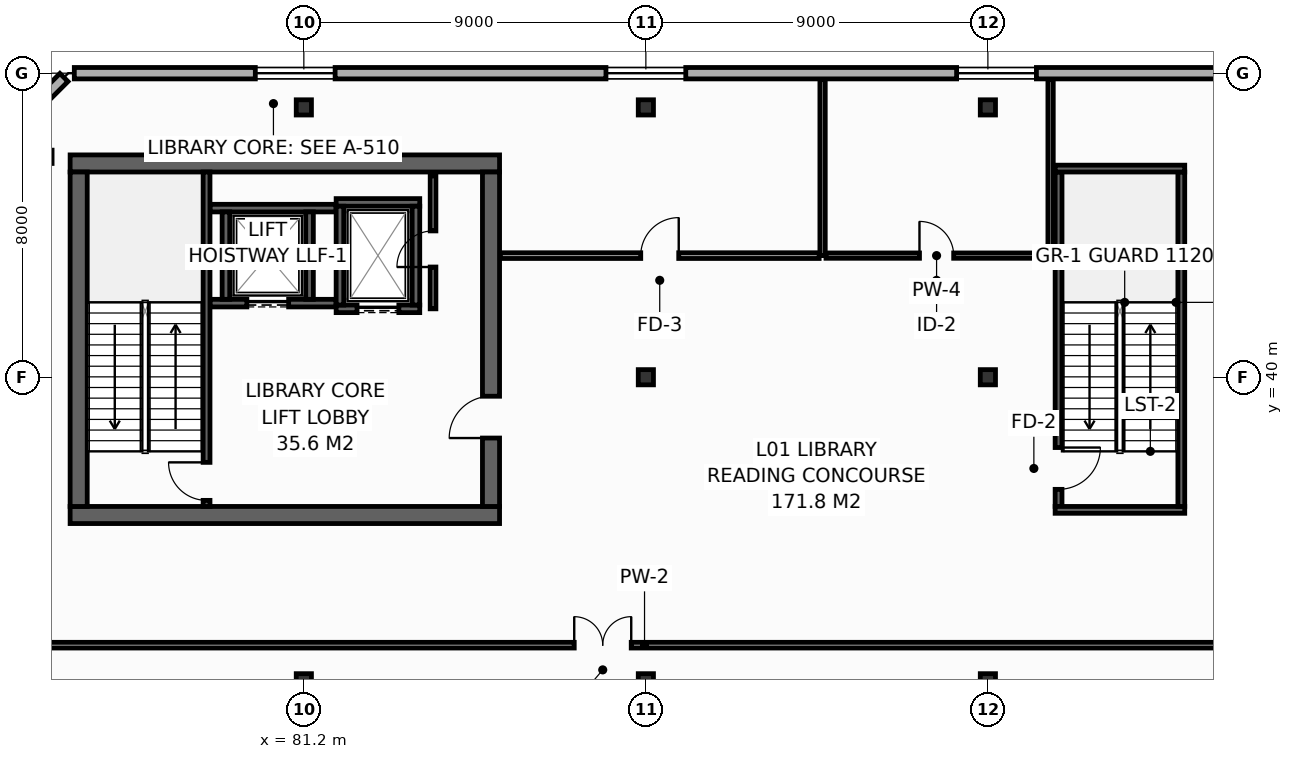
"""IFC4 building model, lengths in metres.
Left out: names, types, materials, properties, quantities, classifications, styles, units other than length and angle.
Written with IfcOpenShell. Run it as: python <this file> out.ifc"""

import sys

from ifc_helpers import new_model, si_unit, direction, frame, frame_2d, origin, origin_2d, place, context, subcontext, project, spatial, rectangle, i_section, extrude, element, fill, save


model = new_model("IFC4")
c1 = context("Model", 3, precision=1e-05, world=origin(), true_north=direction((0.0, 1.0)))
c2 = subcontext(c1, "Body", "Model", "MODEL_VIEW")
j1 = project(units=[si_unit("LENGTHUNIT", "METRE"), si_unit("PLANEANGLEUNIT", "RADIAN")], contexts=[c1])
p1 = place(None, origin())
s1 = spatial("IfcSite", under=j1, at=p1, CompositionType="ELEMENT")
p2 = place(p1, origin())
s2 = spatial("IfcBuilding", under=s1, at=p2, CompositionType="ELEMENT")
p3 = place(p2, frame((0.0, 0.0, 6.0)))
s3 = spatial("IfcBuildingStorey", under=s2, at=p3, CompositionType="ELEMENT", Elevation=6.0)
for number, where, z_axis, x_axis in (
    (1, (75.05, 36.375, 0.0), (0.0, 0.0, 1.0), (1.0, 0.0, 0.0)),
    (2, (75.05, 45.625, 0.0), (0.0, 0.0, 1.0), (1.0, 0.0, 0.0)),
):
    element("IfcWall", number, at=place(p3, frame(where, z_axis=z_axis, x_axis=x_axis)), inside=s3, PredefinedType="SHEAR", context=c2, shape_type="SweptSolid", body=[
        extrude(rectangle(XDim=11.3, YDim=0.45, at=frame_2d((5.65, 0.0))), origin(), (0.0, 0.0, 1.0), 5.1),
    ])
p4 = place(p3, frame((75.275, 36.6, 0.0), z_axis=(0.0, 0.0, 1.0), x_axis=(0.0, 1.0, 0.0)))
e3 = element("IfcWall", 3, at=p4, inside=s3, PredefinedType="SHEAR", context=c2, shape_type="SweptSolid", body=[
    extrude(rectangle(XDim=8.8, YDim=0.45, at=frame_2d((4.4, 0.0))), origin(), (0.0, 0.0, 1.0), 5.1),
])
p5 = place(p3, frame((86.125, 36.6, 0.0), z_axis=(0.0, 0.0, 1.0), x_axis=(0.0, 1.0, 0.0)))
e4 = element("IfcWall", 4, at=p5, inside=s3, PredefinedType="SHEAR", context=c2, shape_type="SweptSolid", body=[
    extrude(rectangle(XDim=8.8, YDim=0.45, at=frame_2d((4.4, 0.0))), origin(), (0.0, 0.0, 1.0), 5.1),
])
p6 = place(p5, frame((1.8, 0.0, 0.0)))
e5 = element("IfcOpeningElement", 5, at=p6, cuts=e4, PredefinedType="OPENING", context=c2, shape_type="SweptSolid", body=[
    extrude(rectangle(XDim=1.1, YDim=2.15, at=frame_2d((0.55, 1.075))), frame((0.0, 0.235, 0.0), z_axis=(0.0, -1.0, 0.0), x_axis=(1.0, 0.0, 0.0)), (0.0, 0.0, 1.0), 0.47),
])
for number, where, z_axis, x_axis in (
    (6, (81.2, 32.0, 0.0), (0.0, 0.0, 1.0), (1.0, 0.0, 0.0)),
    (7, (81.2, 47.1, 0.0), (0.0, 0.0, 1.0), (1.0, 0.0, 0.0)),
    (8, (90.2, 32.0, 0.0), (0.0, 0.0, 1.0), (1.0, 0.0, 0.0)),
    (9, (90.2, 40.0, 0.0), (0.0, 0.0, 1.0), (1.0, 0.0, 0.0)),
    (10, (90.2, 47.1, 0.0), (0.0, 0.0, 1.0), (1.0, 0.0, 0.0)),
    (11, (99.2, 32.0, 0.0), (0.0, 0.0, 1.0), (1.0, 0.0, 0.0)),
    (12, (99.2, 40.0, 0.0), (0.0, 0.0, 1.0), (1.0, 0.0, 0.0)),
    (13, (99.2, 47.1, 0.0), (0.0, 0.0, 1.0), (1.0, 0.0, 0.0)),
):
    element("IfcColumn", number, at=place(p3, frame(where, z_axis=z_axis, x_axis=x_axis)), inside=s3, PredefinedType="COLUMN", context=c2, shape_type="SweptSolid", body=[
        extrude(i_section(OverallWidth=0.4, OverallDepth=0.4, WebThickness=0.013, FlangeThickness=0.021, FilletRadius=0.022, at=origin_2d()), origin(), (0.0, 0.0, 1.0), 5.4),
    ])
p7 = place(p3, frame((78.73, 41.95, 0.0), z_axis=(0.0, 0.0, 1.0), x_axis=(1.0, 0.0, 0.0)))
e14 = element("IfcWall", 14, at=p7, inside=s3, PredefinedType="SHEAR", context=c2, shape_type="SweptSolid", body=[
    extrude(rectangle(XDim=3.32, YDim=0.2, at=frame_2d((1.66, 0.0))), origin(), (0.0, 0.0, 1.0), 5.1),
])
p8 = place(p7, frame((0.97, 0.0, 0.0)))
e15 = element("IfcOpeningElement", 15, at=p8, cuts=e14, PredefinedType="OPENING", context=c2, shape_type="SweptSolid", body=[
    extrude(rectangle(XDim=1.1, YDim=2.2, at=frame_2d((0.55, 1.1))), frame((0.0, 0.11, 0.0), z_axis=(0.0, -1.0, 0.0), x_axis=(1.0, 0.0, 0.0)), (0.0, 0.0, 1.0), 0.22),
])
p9 = place(p3, frame((78.73, 44.45, 0.0), z_axis=(0.0, 0.0, 1.0), x_axis=(1.0, 0.0, 0.0)))
e16 = element("IfcWall", 16, at=p9, inside=s3, PredefinedType="SHEAR", context=c2, shape_type="SweptSolid", body=[
    extrude(rectangle(XDim=3.32, YDim=0.2, at=frame_2d((1.66, 0.0))), origin(), (0.0, 0.0, 1.0), 5.1),
])
for number, where, z_axis, x_axis in (
    (17, (79.15, 42.05, 0.0), (0.0, 0.0, 1.0), (0.0, 1.0, 0.0)),
    (18, (81.35, 42.05, 0.0), (0.0, 0.0, 1.0), (0.0, 1.0, 0.0)),
):
    element("IfcWall", number, at=place(p3, frame(where, z_axis=z_axis, x_axis=x_axis)), inside=s3, PredefinedType="SHEAR", context=c2, shape_type="SweptSolid", body=[
        extrude(rectangle(XDim=2.3, YDim=0.2, at=frame_2d((1.15, 0.0))), origin(), (0.0, 0.0, 1.0), 5.1),
    ])
p10 = place(p3, frame((82.05, 41.8, 0.0), z_axis=(0.0, 0.0, 1.0), x_axis=(1.0, 0.0, 0.0)))
e19 = element("IfcWall", 19, at=p10, inside=s3, PredefinedType="SHEAR", context=c2, shape_type="SweptSolid", body=[
    extrude(rectangle(XDim=2.2, YDim=0.2, at=frame_2d((1.1, 0.0))), origin(), (0.0, 0.0, 1.0), 5.1),
])
p11 = place(p10, frame((0.55, 0.0, 0.0)))
e20 = element("IfcOpeningElement", 20, at=p11, cuts=e19, PredefinedType="OPENING", context=c2, shape_type="SweptSolid", body=[
    extrude(rectangle(XDim=1.1, YDim=2.2, at=frame_2d((0.55, 1.1))), frame((0.0, 0.11, 0.0), z_axis=(0.0, -1.0, 0.0), x_axis=(1.0, 0.0, 0.0)), (0.0, 0.0, 1.0), 0.22),
])
p12 = place(p3, frame((82.05, 44.6, 0.0), z_axis=(0.0, 0.0, 1.0), x_axis=(1.0, 0.0, 0.0)))
e21 = element("IfcWall", 21, at=p12, inside=s3, PredefinedType="SHEAR", context=c2, shape_type="SweptSolid", body=[
    extrude(rectangle(XDim=2.2, YDim=0.2, at=frame_2d((1.1, 0.0))), origin(), (0.0, 0.0, 1.0), 5.1),
])
for number, where, z_axis, x_axis in (
    (22, (82.15, 41.9, 0.0), (0.0, 0.0, 1.0), (0.0, 1.0, 0.0)),
    (23, (84.15, 41.9, 0.0), (0.0, 0.0, 1.0), (0.0, 1.0, 0.0)),
):
    element("IfcWall", number, at=place(p3, frame(where, z_axis=z_axis, x_axis=x_axis)), inside=s3, PredefinedType="SHEAR", context=c2, shape_type="SweptSolid", body=[
        extrude(rectangle(XDim=2.6, YDim=0.2, at=frame_2d((1.3, 0.0))), origin(), (0.0, 0.0, 1.0), 5.1),
    ])
p13 = place(p3, frame((78.64, 36.6, 0.0), z_axis=(0.0, 0.0, 1.0), x_axis=(0.0, 1.0, 0.0)))
e24 = element("IfcWall", 24, at=p13, inside=s3, PredefinedType="SHEAR", context=c2, shape_type="SweptSolid", body=[
    extrude(rectangle(XDim=8.8, YDim=0.18, at=frame_2d((4.4, 0.0))), origin(), (0.0, 0.0, 1.0), 5.1),
])
p14 = place(p13, frame((0.16, 0.0, 0.0)))
e25 = element("IfcOpeningElement", 25, at=p14, cuts=e24, PredefinedType="OPENING", context=c2, shape_type="SweptSolid", body=[
    extrude(rectangle(XDim=1.0, YDim=2.15, at=frame_2d((0.5, 1.075))), frame((0.0, 0.1, 0.0), z_axis=(0.0, -1.0, 0.0), x_axis=(1.0, 0.0, 0.0)), (0.0, 0.0, 1.0), 0.2),
])
p15 = place(p3, frame((101.06, 45.4, 0.0), z_axis=(0.0, 0.0, 1.0), x_axis=(0.0, -1.0, 0.0)))
e26 = element("IfcWall", 26, at=p15, inside=s3, PredefinedType="SHEAR", context=c2, shape_type="SweptSolid", body=[
    extrude(rectangle(XDim=8.8, YDim=0.18, at=frame_2d((4.4, 0.0))), origin(), (0.0, 0.0, 1.0), 5.1),
])
p16 = place(p15, frame((7.25, 0.0, 0.0)))
e27 = element("IfcOpeningElement", 27, at=p16, cuts=e26, PredefinedType="OPENING", context=c2, shape_type="SweptSolid", body=[
    extrude(rectangle(XDim=1.1, YDim=2.15, at=frame_2d((0.55, 1.075))), frame((0.0, 0.1, 0.0), z_axis=(0.0, -1.0, 0.0), x_axis=(1.0, 0.0, 0.0)), (0.0, 0.0, 1.0), 0.2),
])
p17 = place(p3, frame((100.97, 36.51, 0.0), z_axis=(0.0, 0.0, 1.0), x_axis=(1.0, 0.0, 0.0)))
e28 = element("IfcWall", 28, at=p17, inside=s3, PredefinedType="SHEAR", context=c2, shape_type="SweptSolid", body=[
    extrude(rectangle(XDim=3.41, YDim=0.18, at=frame_2d((1.705, 0.0))), origin(), (0.0, 0.0, 1.0), 5.1),
])
p18 = place(p3, frame((104.29, 36.6, 0.0), z_axis=(0.0, 0.0, 1.0), x_axis=(0.0, 1.0, 0.0)))
e29 = element("IfcWall", 29, at=p18, inside=s3, PredefinedType="SHEAR", context=c2, shape_type="SweptSolid", body=[
    extrude(rectangle(XDim=8.8, YDim=0.18, at=frame_2d((4.4, 0.0))), origin(), (0.0, 0.0, 1.0), 5.1),
])
p19 = place(p3, frame((104.38, 45.49, 0.0), z_axis=(0.0, 0.0, 1.0), x_axis=(-1.0, 0.0, 0.0)))
e30 = element("IfcWall", 30, at=p19, inside=s3, PredefinedType="SHEAR", context=c2, shape_type="SweptSolid", body=[
    extrude(rectangle(XDim=3.41, YDim=0.18, at=frame_2d((1.705, 0.0))), origin(), (0.0, 0.0, 1.0), 5.1),
])
p20 = place(p3, frame((84.6, 41.8, 0.0), z_axis=(0.0, 0.0, 1.0), x_axis=(0.0, 1.0, 0.0)))
e31 = element("IfcWall", 31, at=p20, inside=s3, PredefinedType="PARTITIONING", context=c2, shape_type="SweptSolid", body=[
    extrude(rectangle(XDim=3.5, YDim=0.15, at=frame_2d((1.75, 0.0))), origin(), (0.0, 0.0, 1.0), 5.1),
])
p21 = place(p20, frame((1.1, 0.0, 0.0)))
e32 = element("IfcOpeningElement", 32, at=p21, cuts=e31, PredefinedType="OPENING", context=c2, shape_type="SweptSolid", body=[
    extrude(rectangle(XDim=0.95, YDim=2.15, at=frame_2d((0.475, 1.075))), frame((0.0, 0.085, 0.0), z_axis=(0.0, -1.0, 0.0), x_axis=(1.0, 0.0, 0.0)), (0.0, 0.0, 1.0), 0.17),
])
p22 = place(p3, frame((105.24, 48.0, 0.0), z_axis=(0.0, 0.0, 1.0), x_axis=(-1.0, 0.0, 0.0)))
e33 = element("IfcWall", 33, at=p22, inside=s3, PredefinedType="STANDARD", context=c2, shape_type="SweptSolid", body=[
    extrude(rectangle(XDim=30.08, YDim=0.3, at=frame_2d((15.04, 0.0))), origin(), (0.0, 0.0, 1.0), 5.1),
])
p23 = place(p22, frame((4.763, 0.0, 0.9)))
e34 = element("IfcOpeningElement", 34, at=p23, cuts=e33, PredefinedType="OPENING", context=c2, shape_type="SweptSolid", body=[
    extrude(rectangle(XDim=2.1, YDim=2.5, at=frame_2d((1.05, 1.25))), frame((0.0, 0.16, 0.0), z_axis=(0.0, -1.0, 0.0), x_axis=(1.0, 0.0, 0.0)), (0.0, 0.0, 1.0), 0.32),
])
p24 = place(p22, frame((13.99, 0.0, 0.9)))
e35 = element("IfcOpeningElement", 35, at=p24, cuts=e33, PredefinedType="OPENING", context=c2, shape_type="SweptSolid", body=[
    extrude(rectangle(XDim=2.1, YDim=2.5, at=frame_2d((1.05, 1.25))), frame((0.0, 0.16, 0.0), z_axis=(0.0, -1.0, 0.0), x_axis=(1.0, 0.0, 0.0)), (0.0, 0.0, 1.0), 0.32),
])
p25 = place(p22, frame((23.217, 0.0, 0.9)))
e36 = element("IfcOpeningElement", 36, at=p25, cuts=e33, PredefinedType="OPENING", context=c2, shape_type="SweptSolid", body=[
    extrude(rectangle(XDim=2.1, YDim=2.5, at=frame_2d((1.05, 1.25))), frame((0.0, 0.16, 0.0), z_axis=(0.0, -1.0, 0.0), x_axis=(1.0, 0.0, 0.0)), (0.0, 0.0, 1.0), 0.32),
])
p26 = place(p3, frame((74.887, 47.887, 0.0), z_axis=(0.0, 0.0, 1.0), x_axis=(-0.707106781187, -0.707106781187, 0.0)))
e37 = element("IfcWall", 37, at=p26, inside=s3, PredefinedType="STANDARD", context=c2, shape_type="SweptSolid", body=[
    extrude(rectangle(XDim=3.64, YDim=0.3, at=frame_2d((1.82, 0.0))), origin(), (0.0, 0.0, 1.0), 5.1),
])
p27 = place(p3, frame((72.3, 32.95, 0.0), z_axis=(0.0, 0.0, 1.0), x_axis=(1.0, 0.0, 0.0)))
e38 = element("IfcWall", 38, at=p27, inside=s3, PredefinedType="PARTITIONING", context=c2, shape_type="SweptSolid", body=[
    extrude(rectangle(XDim=35.73, YDim=0.15, at=frame_2d((17.865, 0.0))), origin(), (0.0, 0.0, 1.0), 4.385),
])
p28 = place(p27, frame((16.015, 0.0, 0.0)))
e39 = element("IfcOpeningElement", 39, at=p28, cuts=e38, PredefinedType="OPENING", context=c2, shape_type="SweptSolid", body=[
    extrude(rectangle(XDim=1.5, YDim=2.2, at=frame_2d((0.75, 1.1))), frame((0.0, 0.085, 0.0), z_axis=(0.0, -1.0, 0.0), x_axis=(1.0, 0.0, 0.0)), (0.0, 0.0, 1.0), 0.17),
])
p29 = place(p3, frame((94.85, 43.2, 0.0), z_axis=(0.0, 0.0, 1.0), x_axis=(0.0, 1.0, 0.0)))
e40 = element("IfcWall", 40, at=p29, inside=s3, PredefinedType="PARTITIONING", context=c2, shape_type="SweptSolid", body=[
    extrude(rectangle(XDim=4.63, YDim=0.14, at=frame_2d((2.315, 0.0))), origin(), (0.0, 0.0, 1.0), 4.385),
])
p30 = place(p3, frame((100.85, 43.2, 0.0), z_axis=(0.0, 0.0, 1.0), x_axis=(0.0, 1.0, 0.0)))
e41 = element("IfcWall", 41, at=p30, inside=s3, PredefinedType="PARTITIONING", context=c2, shape_type="SweptSolid", body=[
    extrude(rectangle(XDim=4.63, YDim=0.14, at=frame_2d((2.315, 0.0))), origin(), (0.0, 0.0, 1.0), 5.1),
])
p31 = place(p3, frame((86.37, 43.2, 0.0), z_axis=(0.0, 0.0, 1.0), x_axis=(1.0, 0.0, 0.0)))
e42 = element("IfcWall", 42, at=p31, inside=s3, PredefinedType="PARTITIONING", context=c2, shape_type="SweptSolid", body=[
    extrude(rectangle(XDim=8.39, YDim=0.15, at=frame_2d((4.195, 0.0))), origin(), (0.0, 0.0, 1.0), 4.385),
])
p32 = place(p31, frame((3.695, 0.0, 0.0)))
e43 = element("IfcOpeningElement", 43, at=p32, cuts=e42, PredefinedType="OPENING", context=c2, shape_type="SweptSolid", body=[
    extrude(rectangle(XDim=1.0, YDim=2.15, at=frame_2d((0.5, 1.075))), frame((0.0, 0.085, 0.0), z_axis=(0.0, -1.0, 0.0), x_axis=(1.0, 0.0, 0.0)), (0.0, 0.0, 1.0), 0.17),
])
p33 = place(p3, frame((94.94, 43.2, 0.0), z_axis=(0.0, 0.0, 1.0), x_axis=(1.0, 0.0, 0.0)))
e44 = element("IfcWall", 44, at=p33, inside=s3, PredefinedType="PARTITIONING", context=c2, shape_type="SweptSolid", body=[
    extrude(rectangle(XDim=5.82, YDim=0.14, at=frame_2d((2.91, 0.0))), origin(), (0.0, 0.0, 1.0), 4.385),
])
p34 = place(p33, frame((2.46, 0.0, 0.0)))
e45 = element("IfcOpeningElement", 45, at=p34, cuts=e44, PredefinedType="OPENING", context=c2, shape_type="SweptSolid", body=[
    extrude(rectangle(XDim=0.9, YDim=2.1, at=frame_2d((0.45, 1.05))), frame((0.0, 0.08, 0.0), z_axis=(0.0, -1.0, 0.0), x_axis=(1.0, 0.0, 0.0)), (0.0, 0.0, 1.0), 0.16),
])
p35 = place(p8, origin())
e46 = element("IfcDoor", 46, at=p35, inside=s3, OperationType="SLIDING_TO_LEFT", PredefinedType="DOOR", context=c2, shape_type="SweptSolid", body=[
    extrude(rectangle(XDim=1.1, YDim=2.2, at=frame_2d((0.55, 1.1))), frame((0.0, 0.025, 0.0), z_axis=(0.0, -1.0, 0.0), x_axis=(1.0, 0.0, 0.0)), (0.0, 0.0, 1.0), 0.05),
])
fill(e15, e46)
p36 = place(p11, origin())
e47 = element("IfcDoor", 47, at=p36, inside=s3, OperationType="SLIDING_TO_LEFT", PredefinedType="DOOR", context=c2, shape_type="SweptSolid", body=[
    extrude(rectangle(XDim=1.1, YDim=2.2, at=frame_2d((0.55, 1.1))), frame((0.0, 0.025, 0.0), z_axis=(0.0, -1.0, 0.0), x_axis=(1.0, 0.0, 0.0)), (0.0, 0.0, 1.0), 0.05),
])
fill(e20, e47)
p37 = place(p14, origin())
e48 = element("IfcDoor", 48, at=p37, inside=s3, OperationType="SINGLE_SWING_RIGHT", PredefinedType="DOOR", context=c2, shape_type="SweptSolid", body=[
    extrude(rectangle(XDim=1.0, YDim=2.15, at=frame_2d((0.5, 1.075))), frame((0.0, 0.025, 0.0), z_axis=(0.0, -1.0, 0.0), x_axis=(1.0, 0.0, 0.0)), (0.0, 0.0, 1.0), 0.05),
])
fill(e25, e48)
p38 = place(p16, origin())
e49 = element("IfcDoor", 49, at=p38, inside=s3, OperationType="SINGLE_SWING_LEFT", PredefinedType="DOOR", context=c2, shape_type="SweptSolid", body=[
    extrude(rectangle(XDim=1.1, YDim=2.15, at=frame_2d((0.55, 1.075))), frame((0.0, 0.025, 0.0), z_axis=(0.0, -1.0, 0.0), x_axis=(1.0, 0.0, 0.0)), (0.0, 0.0, 1.0), 0.05),
])
fill(e27, e49)
p39 = place(p6, origin())
e50 = element("IfcDoor", 50, at=p39, inside=s3, OperationType="SINGLE_SWING_LEFT", PredefinedType="DOOR", context=c2, shape_type="SweptSolid", body=[
    extrude(rectangle(XDim=1.1, YDim=2.15, at=frame_2d((0.55, 1.075))), frame((0.0, 0.025, 0.0), z_axis=(0.0, -1.0, 0.0), x_axis=(1.0, 0.0, 0.0)), (0.0, 0.0, 1.0), 0.05),
])
fill(e5, e50)
p40 = place(p21, origin())
e51 = element("IfcDoor", 51, at=p40, inside=s3, OperationType="SINGLE_SWING_LEFT", PredefinedType="DOOR", context=c2, shape_type="SweptSolid", body=[
    extrude(rectangle(XDim=0.95, YDim=2.15, at=frame_2d((0.475, 1.075))), frame((0.0, 0.025, 0.0), z_axis=(0.0, -1.0, 0.0), x_axis=(1.0, 0.0, 0.0)), (0.0, 0.0, 1.0), 0.05),
])
fill(e32, e51)
p41 = place(p23, origin())
e52 = element("IfcWindow", 52, at=p41, inside=s3, PartitioningType="DOUBLE_PANEL_VERTICAL", PredefinedType="WINDOW", context=c2, shape_type="SweptSolid", body=[
    extrude(rectangle(XDim=2.1, YDim=2.5, at=frame_2d((1.05, 1.25))), frame((0.0, 0.03, 0.0), z_axis=(0.0, -1.0, 0.0), x_axis=(1.0, 0.0, 0.0)), (0.0, 0.0, 1.0), 0.06),
])
fill(e34, e52)
p42 = place(p24, origin())
e53 = element("IfcWindow", 53, at=p42, inside=s3, PartitioningType="DOUBLE_PANEL_VERTICAL", PredefinedType="WINDOW", context=c2, shape_type="SweptSolid", body=[
    extrude(rectangle(XDim=2.1, YDim=2.5, at=frame_2d((1.05, 1.25))), frame((0.0, 0.03, 0.0), z_axis=(0.0, -1.0, 0.0), x_axis=(1.0, 0.0, 0.0)), (0.0, 0.0, 1.0), 0.06),
])
fill(e35, e53)
p43 = place(p25, origin())
e54 = element("IfcWindow", 54, at=p43, inside=s3, PartitioningType="DOUBLE_PANEL_VERTICAL", PredefinedType="WINDOW", context=c2, shape_type="SweptSolid", body=[
    extrude(rectangle(XDim=2.1, YDim=2.5, at=frame_2d((1.05, 1.25))), frame((0.0, 0.03, 0.0), z_axis=(0.0, -1.0, 0.0), x_axis=(1.0, 0.0, 0.0)), (0.0, 0.0, 1.0), 0.06),
])
fill(e36, e54)
p44 = place(p28, origin())
e55 = element("IfcDoor", 55, at=p44, inside=s3, OperationType="DOUBLE_DOOR_SINGLE_SWING", PredefinedType="DOOR", context=c2, shape_type="SweptSolid", body=[
    extrude(rectangle(XDim=1.5, YDim=2.2, at=frame_2d((0.75, 1.1))), frame((0.0, 0.025, 0.0), z_axis=(0.0, -1.0, 0.0), x_axis=(1.0, 0.0, 0.0)), (0.0, 0.0, 1.0), 0.05),
])
fill(e39, e55)
p45 = place(p32, origin())
e56 = element("IfcDoor", 56, at=p45, inside=s3, OperationType="SINGLE_SWING_RIGHT", PredefinedType="DOOR", context=c2, shape_type="SweptSolid", body=[
    extrude(rectangle(XDim=1.0, YDim=2.15, at=frame_2d((0.5, 1.075))), frame((0.0, 0.025, 0.0), z_axis=(0.0, -1.0, 0.0), x_axis=(1.0, 0.0, 0.0)), (0.0, 0.0, 1.0), 0.05),
])
fill(e43, e56)
p46 = place(p34, origin())
e57 = element("IfcDoor", 57, at=p46, inside=s3, OperationType="SINGLE_SWING_LEFT", PredefinedType="DOOR", context=c2, shape_type="SweptSolid", body=[
    extrude(rectangle(XDim=0.9, YDim=2.1, at=frame_2d((0.45, 1.05))), frame((0.0, 0.025, 0.0), z_axis=(0.0, -1.0, 0.0), x_axis=(1.0, 0.0, 0.0)), (0.0, 0.0, 1.0), 0.05),
])
fill(e45, e57)
save(model, sys.argv[1])
